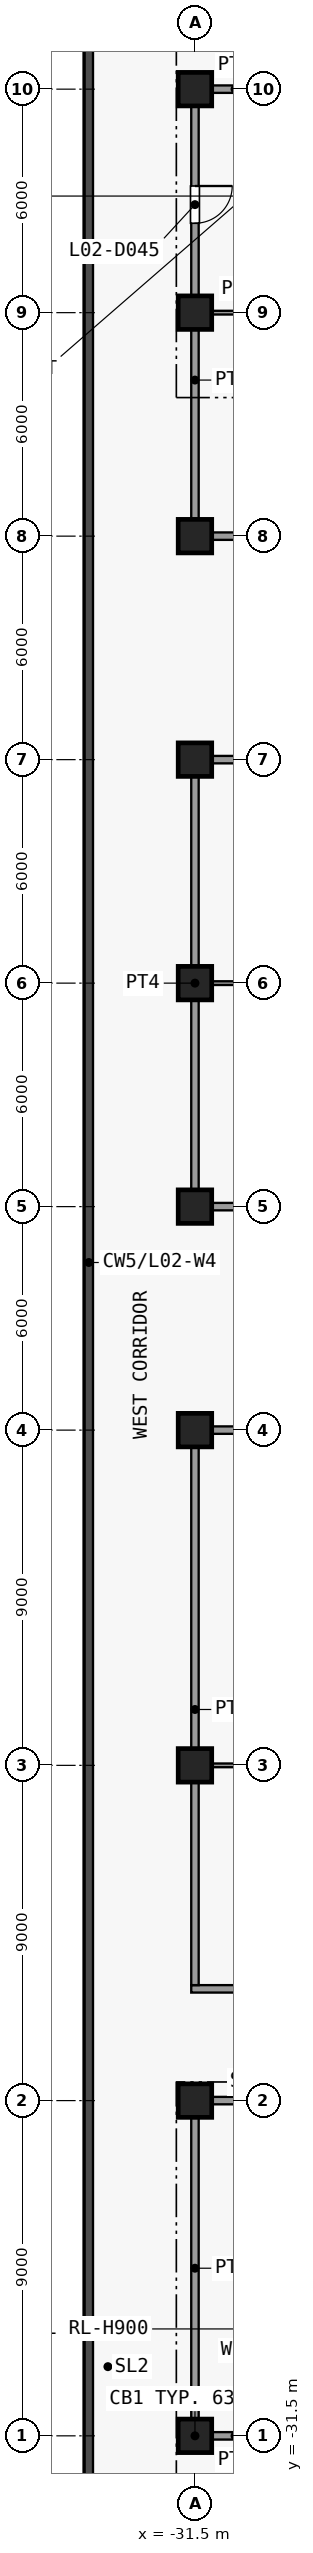
"""IFC4 building model, lengths in metres.
Left out: names, types, materials, properties, quantities, classifications, styles, units other than length and angle.
Written with IfcOpenShell. Run it as: python <this file> out.ifc"""

import sys

from ifc_helpers import new_model, si_unit, direction, frame, frame_2d, origin, origin_2d, place, context, subcontext, project, spatial, rectangle, extrude, element, fill, save


model = new_model("IFC4")
c1 = context("Model", 3, precision=1e-05, world=origin(), true_north=direction((0.0, 1.0)))
c2 = subcontext(c1, "Body", "Model", "MODEL_VIEW")
j1 = project(units=[si_unit("LENGTHUNIT", "METRE"), si_unit("PLANEANGLEUNIT", "RADIAN")], contexts=[c1])
p1 = place(None, origin())
s1 = spatial("IfcSite", under=j1, at=p1, CompositionType="ELEMENT")
p2 = place(p1, origin())
s2 = spatial("IfcBuilding", under=s1, at=p2, CompositionType="ELEMENT")
p3 = place(p2, frame((0.0, 0.0, 13.5)))
s3 = spatial("IfcBuildingStorey", under=s2, at=p3, CompositionType="ELEMENT", Elevation=13.5)
for number, where, z_axis, x_axis in (
    (1, (-31.5, -31.5, 0.0), (0.0, 0.0, 1.0), (1.0, 0.0, 0.0)),
    (2, (-31.5, -22.5, 0.0), (0.0, 0.0, 1.0), (1.0, 0.0, 0.0)),
    (3, (-31.5, -13.5, 0.0), (0.0, 0.0, 1.0), (1.0, 0.0, 0.0)),
    (4, (-31.5, -4.5, 0.0), (0.0, 0.0, 1.0), (1.0, 0.0, 0.0)),
    (5, (-31.5, 1.5, 0.0), (0.0, 0.0, 1.0), (1.0, 0.0, 0.0)),
    (6, (-31.5, 7.5, 0.0), (0.0, 0.0, 1.0), (1.0, 0.0, 0.0)),
    (7, (-31.5, 13.5, 0.0), (0.0, 0.0, 1.0), (1.0, 0.0, 0.0)),
    (8, (-31.5, 19.5, 0.0), (0.0, 0.0, 1.0), (1.0, 0.0, 0.0)),
    (9, (-31.5, 25.5, 0.0), (0.0, 0.0, 1.0), (1.0, 0.0, 0.0)),
    (10, (-31.5, 31.5, 0.0), (0.0, 0.0, 1.0), (1.0, 0.0, 0.0)),
):
    element("IfcColumn", number, at=place(p3, frame(where, z_axis=z_axis, x_axis=x_axis)), inside=s3, PredefinedType="COLUMN", context=c2, shape_type="SweptSolid", body=[
        extrude(rectangle(XDim=0.9, YDim=0.9, at=origin_2d()), origin(), (0.0, 0.0, 1.0), 5.0),
    ])
p4 = place(p3, frame((-31.6, -31.5, 0.0), z_axis=(0.0, 0.0, 1.0), x_axis=(1.0, 0.0, 0.0)))
e11 = element("IfcWall", 11, at=p4, inside=s3, PredefinedType="PARTITIONING", context=c2, shape_type="SweptSolid", body=[
    extrude(rectangle(XDim=2.35, YDim=0.2, at=frame_2d((1.175, 0.0))), origin(), (0.0, 0.0, 1.0), 4.65),
])
p5 = place(p3, frame((-31.6, -22.5, 0.0), z_axis=(0.0, 0.0, 1.0), x_axis=(1.0, 0.0, 0.0)))
e12 = element("IfcWall", 12, at=p5, inside=s3, PredefinedType="PARTITIONING", context=c2, shape_type="SweptSolid", body=[
    extrude(rectangle(XDim=14.2, YDim=0.2, at=frame_2d((7.1, 0.0))), origin(), (0.0, 0.0, 1.0), 4.65),
])
p6 = place(p3, frame((-31.6, -19.5, 0.0), z_axis=(0.0, 0.0, 1.0), x_axis=(1.0, 0.0, 0.0)))
e13 = element("IfcWall", 13, at=p6, inside=s3, PredefinedType="PARTITIONING", context=c2, shape_type="SweptSolid", body=[
    extrude(rectangle(XDim=18.1, YDim=0.2, at=frame_2d((9.05, 0.0))), origin(), (0.0, 0.0, 1.0), 4.65),
])
p7 = place(p6, frame((3.2, 0.0, 0.0)))
e14 = element("IfcOpeningElement", 14, at=p7, cuts=e13, PredefinedType="OPENING", context=c2, shape_type="SweptSolid", body=[
    extrude(rectangle(XDim=1.0, YDim=2.1, at=frame_2d((0.5, 1.05))), frame((0.0, 0.11, 0.0), z_axis=(0.0, -1.0, 0.0), x_axis=(1.0, 0.0, 0.0)), (0.0, 0.0, 1.0), 0.22),
])
p8 = place(p6, frame((14.0, 0.0, 0.0)))
e15 = element("IfcOpeningElement", 15, at=p8, cuts=e13, PredefinedType="OPENING", context=c2, shape_type="SweptSolid", body=[
    extrude(rectangle(XDim=1.0, YDim=2.1, at=frame_2d((0.5, 1.05))), frame((0.0, 0.11, 0.0), z_axis=(0.0, -1.0, 0.0), x_axis=(1.0, 0.0, 0.0)), (0.0, 0.0, 1.0), 0.22),
])
p9 = place(p3, frame((-31.4, -13.5, 0.0), z_axis=(0.0, 0.0, 1.0), x_axis=(1.0, 0.0, 0.0)))
e16 = element("IfcWall", 16, at=p9, inside=s3, PredefinedType="PARTITIONING", context=c2, shape_type="SweptSolid", body=[
    extrude(rectangle(XDim=17.9, YDim=0.1, at=frame_2d((8.95, 0.0))), origin(), (0.0, 0.0, 1.0), 4.65),
])
p10 = place(p3, frame((-31.6, -4.5, 0.0), z_axis=(0.0, 0.0, 1.0), x_axis=(1.0, 0.0, 0.0)))
e17 = element("IfcWall", 17, at=p10, inside=s3, PredefinedType="PARTITIONING", context=c2, shape_type="SweptSolid", body=[
    extrude(rectangle(XDim=18.2, YDim=0.2, at=frame_2d((9.1, 0.0))), origin(), (0.0, 0.0, 1.0), 4.65),
])
p11 = place(p10, frame((3.2, 0.0, 0.0)))
e18 = element("IfcOpeningElement", 18, at=p11, cuts=e17, PredefinedType="OPENING", context=c2, shape_type="SweptSolid", body=[
    extrude(rectangle(XDim=1.0, YDim=2.1, at=frame_2d((0.5, 1.05))), frame((0.0, 0.11, 0.0), z_axis=(0.0, -1.0, 0.0), x_axis=(1.0, 0.0, 0.0)), (0.0, 0.0, 1.0), 0.22),
])
p12 = place(p10, frame((13.2, 0.0, 0.0)))
e19 = element("IfcOpeningElement", 19, at=p12, cuts=e17, PredefinedType="OPENING", context=c2, shape_type="SweptSolid", body=[
    extrude(rectangle(XDim=1.0, YDim=2.1, at=frame_2d((0.5, 1.05))), frame((0.0, 0.11, 0.0), z_axis=(0.0, -1.0, 0.0), x_axis=(1.0, 0.0, 0.0)), (0.0, 0.0, 1.0), 0.22),
])
p13 = place(p3, frame((-31.6, 1.5, 0.0), z_axis=(0.0, 0.0, 1.0), x_axis=(1.0, 0.0, 0.0)))
e20 = element("IfcWall", 20, at=p13, inside=s3, PredefinedType="PARTITIONING", context=c2, shape_type="SweptSolid", body=[
    extrude(rectangle(XDim=11.3, YDim=0.2, at=frame_2d((5.65, 0.0))), origin(), (0.0, 0.0, 1.0), 4.65),
])
p14 = place(p13, frame((5.1, 0.0, 0.0)))
e21 = element("IfcOpeningElement", 21, at=p14, cuts=e20, PredefinedType="OPENING", context=c2, shape_type="SweptSolid", body=[
    extrude(rectangle(XDim=1.0, YDim=2.1, at=frame_2d((0.5, 1.05))), frame((0.0, 0.11, 0.0), z_axis=(0.0, -1.0, 0.0), x_axis=(1.0, 0.0, 0.0)), (0.0, 0.0, 1.0), 0.22),
])
p15 = place(p3, frame((-31.4, 7.5, 0.0), z_axis=(0.0, 0.0, 1.0), x_axis=(1.0, 0.0, 0.0)))
e22 = element("IfcWall", 22, at=p15, inside=s3, PredefinedType="PARTITIONING", context=c2, shape_type="SweptSolid", body=[
    extrude(rectangle(XDim=10.9, YDim=0.1, at=frame_2d((5.45, 0.0))), origin(), (0.0, 0.0, 1.0), 4.65),
])
p16 = place(p3, frame((-31.6, 13.5, 0.0), z_axis=(0.0, 0.0, 1.0), x_axis=(1.0, 0.0, 0.0)))
e23 = element("IfcWall", 23, at=p16, inside=s3, PredefinedType="PARTITIONING", context=c2, shape_type="SweptSolid", body=[
    extrude(rectangle(XDim=11.3, YDim=0.2, at=frame_2d((5.65, 0.0))), origin(), (0.0, 0.0, 1.0), 4.65),
])
p17 = place(p16, frame((5.1, 0.0, 0.0)))
e24 = element("IfcOpeningElement", 24, at=p17, cuts=e23, PredefinedType="OPENING", context=c2, shape_type="SweptSolid", body=[
    extrude(rectangle(XDim=1.0, YDim=2.1, at=frame_2d((0.5, 1.05))), frame((0.0, 0.11, 0.0), z_axis=(0.0, -1.0, 0.0), x_axis=(1.0, 0.0, 0.0)), (0.0, 0.0, 1.0), 0.22),
])
p18 = place(p3, frame((-31.6, 19.5, 0.0), z_axis=(0.0, 0.0, 1.0), x_axis=(1.0, 0.0, 0.0)))
e25 = element("IfcWall", 25, at=p18, inside=s3, PredefinedType="PARTITIONING", context=c2, shape_type="SweptSolid", body=[
    extrude(rectangle(XDim=60.1, YDim=0.2, at=frame_2d((30.05, 0.0))), origin(), (0.0, 0.0, 1.0), 4.65),
])
p19 = place(p18, frame((4.8, 0.0, 0.0)))
e26 = element("IfcOpeningElement", 26, at=p19, cuts=e25, PredefinedType="OPENING", context=c2, shape_type="SweptSolid", body=[
    extrude(rectangle(XDim=1.0, YDim=2.1, at=frame_2d((0.5, 1.05))), frame((0.0, 0.11, 0.0), z_axis=(0.0, -1.0, 0.0), x_axis=(1.0, 0.0, 0.0)), (0.0, 0.0, 1.0), 0.22),
])
p20 = place(p18, frame((19.2, 0.0, 0.0)))
e27 = element("IfcOpeningElement", 27, at=p20, cuts=e25, PredefinedType="OPENING", context=c2, shape_type="SweptSolid", body=[
    extrude(rectangle(XDim=1.0, YDim=2.1, at=frame_2d((0.5, 1.05))), frame((0.0, 0.11, 0.0), z_axis=(0.0, -1.0, 0.0), x_axis=(1.0, 0.0, 0.0)), (0.0, 0.0, 1.0), 0.22),
])
p21 = place(p18, frame((29.8, 0.0, 0.0)))
e28 = element("IfcOpeningElement", 28, at=p21, cuts=e25, PredefinedType="OPENING", context=c2, shape_type="SweptSolid", body=[
    extrude(rectangle(XDim=1.0, YDim=2.1, at=frame_2d((0.5, 1.05))), frame((0.0, 0.11, 0.0), z_axis=(0.0, -1.0, 0.0), x_axis=(1.0, 0.0, 0.0)), (0.0, 0.0, 1.0), 0.22),
])
p22 = place(p18, frame((43.0, 0.0, 0.0)))
e29 = element("IfcOpeningElement", 29, at=p22, cuts=e25, PredefinedType="OPENING", context=c2, shape_type="SweptSolid", body=[
    extrude(rectangle(XDim=1.0, YDim=2.1, at=frame_2d((0.5, 1.05))), frame((0.0, 0.11, 0.0), z_axis=(0.0, -1.0, 0.0), x_axis=(1.0, 0.0, 0.0)), (0.0, 0.0, 1.0), 0.22),
])
p23 = place(p18, frame((52.1, 0.0, 0.0)))
e30 = element("IfcOpeningElement", 30, at=p23, cuts=e25, PredefinedType="OPENING", context=c2, shape_type="SweptSolid", body=[
    extrude(rectangle(XDim=1.0, YDim=2.1, at=frame_2d((0.5, 1.05))), frame((0.0, 0.11, 0.0), z_axis=(0.0, -1.0, 0.0), x_axis=(1.0, 0.0, 0.0)), (0.0, 0.0, 1.0), 0.22),
])
p24 = place(p3, frame((-31.4, 25.5, 0.0), z_axis=(0.0, 0.0, 1.0), x_axis=(1.0, 0.0, 0.0)))
e31 = element("IfcWall", 31, at=p24, inside=s3, PredefinedType="PARTITIONING", context=c2, shape_type="SweptSolid", body=[
    extrude(rectangle(XDim=2.15, YDim=0.1, at=frame_2d((1.075, 0.0))), origin(), (0.0, 0.0, 1.0), 4.65),
])
p25 = place(p3, frame((-31.6, 31.5, 0.0), z_axis=(0.0, 0.0, 1.0), x_axis=(1.0, 0.0, 0.0)))
e32 = element("IfcWall", 32, at=p25, inside=s3, PredefinedType="PARTITIONING", context=c2, shape_type="SweptSolid", body=[
    extrude(rectangle(XDim=2.35, YDim=0.2, at=frame_2d((1.175, 0.0))), origin(), (0.0, 0.0, 1.0), 4.65),
])
p26 = place(p3, frame((-31.5, -31.4, 0.0), z_axis=(0.0, 0.0, 1.0), x_axis=(0.0, 1.0, 0.0)))
e33 = element("IfcWall", 33, at=p26, inside=s3, PredefinedType="PARTITIONING", context=c2, shape_type="SweptSolid", body=[
    extrude(rectangle(XDim=8.8, YDim=0.2, at=frame_2d((4.4, 0.0))), origin(), (0.0, 0.0, 1.0), 4.65),
])
p27 = place(p3, frame((-31.5, -19.4, 0.0), z_axis=(0.0, 0.0, 1.0), x_axis=(0.0, 1.0, 0.0)))
e34 = element("IfcWall", 34, at=p27, inside=s3, PredefinedType="PARTITIONING", context=c2, shape_type="SweptSolid", body=[
    extrude(rectangle(XDim=14.8, YDim=0.2, at=frame_2d((7.4, 0.0))), origin(), (0.0, 0.0, 1.0), 4.65),
])
p28 = place(p3, frame((-31.5, 1.6, 0.0), z_axis=(0.0, 0.0, 1.0), x_axis=(0.0, 1.0, 0.0)))
e35 = element("IfcWall", 35, at=p28, inside=s3, PredefinedType="PARTITIONING", context=c2, shape_type="SweptSolid", body=[
    extrude(rectangle(XDim=11.8, YDim=0.2, at=frame_2d((5.9, 0.0))), origin(), (0.0, 0.0, 1.0), 4.65),
])
p29 = place(p3, frame((-31.5, 19.6, 0.0), z_axis=(0.0, 0.0, 1.0), x_axis=(0.0, 1.0, 0.0)))
e36 = element("IfcWall", 36, at=p29, inside=s3, PredefinedType="PARTITIONING", context=c2, shape_type="SweptSolid", body=[
    extrude(rectangle(XDim=11.8, YDim=0.2, at=frame_2d((5.9, 0.0))), origin(), (0.0, 0.0, 1.0), 4.65),
])
p30 = place(p29, frame((8.3, 0.0, 0.0)))
e37 = element("IfcOpeningElement", 37, at=p30, cuts=e36, PredefinedType="OPENING", context=c2, shape_type="SweptSolid", body=[
    extrude(rectangle(XDim=1.0, YDim=2.1, at=frame_2d((0.5, 1.05))), frame((0.0, 0.11, 0.0), z_axis=(0.0, -1.0, 0.0), x_axis=(1.0, 0.0, 0.0)), (0.0, 0.0, 1.0), 0.22),
])
p31 = place(p30, origin())
e38 = element("IfcDoor", 38, at=p31, inside=s3, OperationType="SINGLE_SWING_RIGHT", PredefinedType="DOOR", context=c2, shape_type="SweptSolid", body=[
    extrude(rectangle(XDim=1.0, YDim=2.1, at=frame_2d((0.5, 1.05))), frame((0.0, 0.025, 0.0), z_axis=(0.0, -1.0, 0.0), x_axis=(1.0, 0.0, 0.0)), (0.0, 0.0, 1.0), 0.05),
])
fill(e37, e38)
save(model, sys.argv[1])
